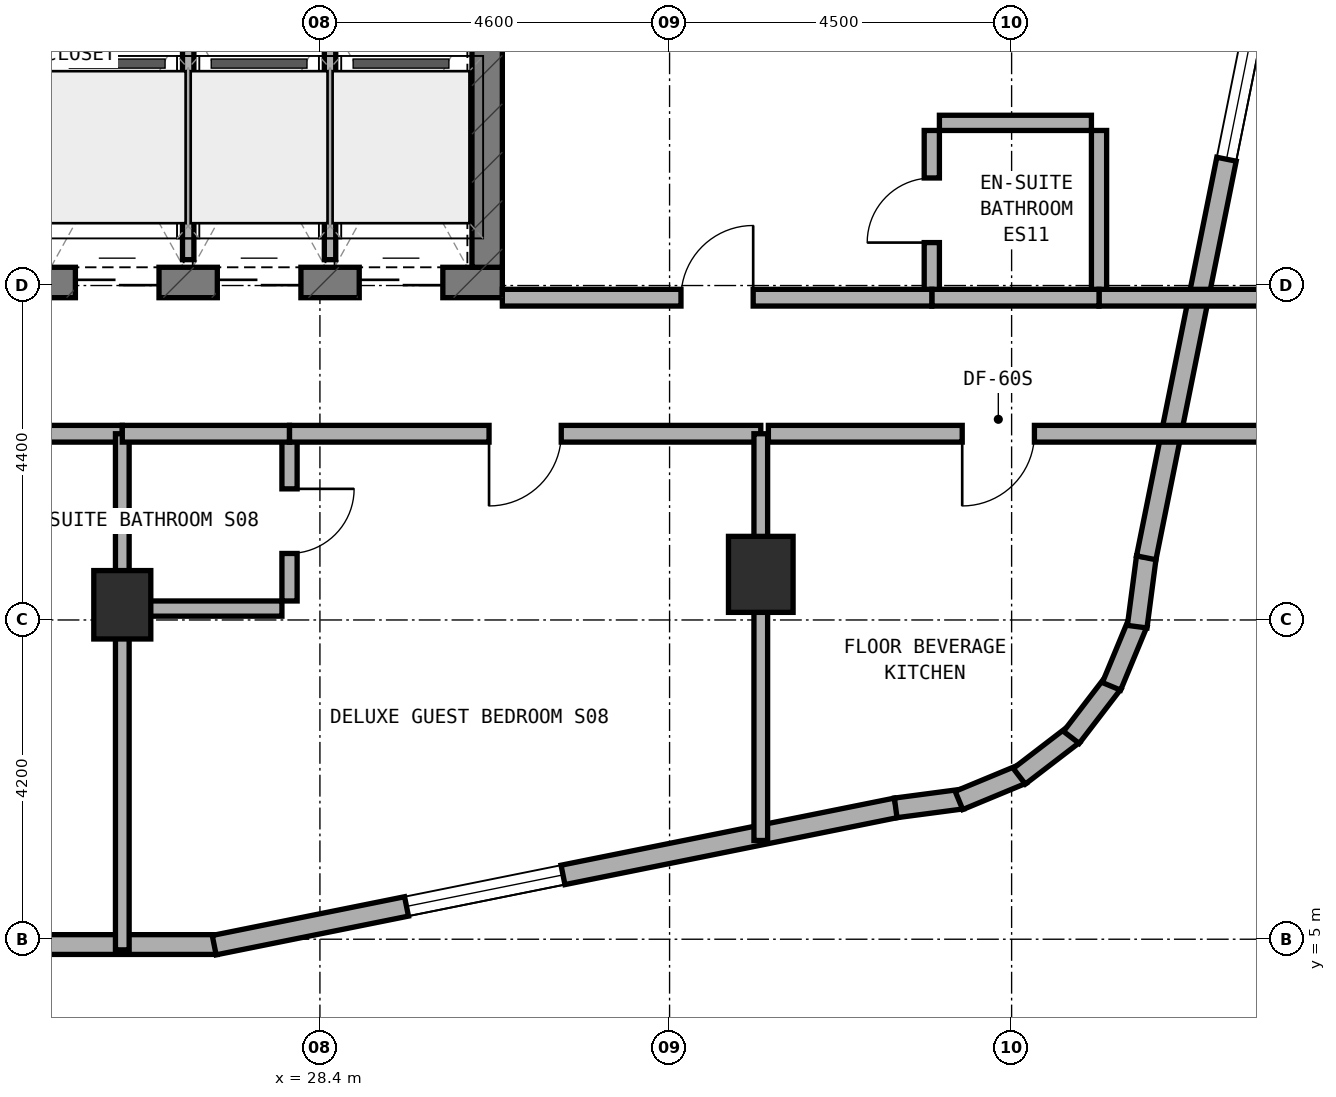
"""IFC4 building model, lengths in metres.
Left out: names, types, materials, properties, quantities, classifications, styles, units other than length and angle.
Written with IfcOpenShell. Run it as: python <this file> out.ifc"""

import sys

from ifc_helpers import new_model, si_unit, direction, frame, frame_2d, origin, origin_2d, place, context, subcontext, project, spatial, rectangle, extrude, element, fill, save


model = new_model("IFC4")
c1 = context("Model", 3, precision=1e-05, world=origin(), true_north=direction((0.0, 1.0)))
c2 = subcontext(c1, "Body", "Model", "MODEL_VIEW")
j1 = project(units=[si_unit("LENGTHUNIT", "METRE"), si_unit("PLANEANGLEUNIT", "RADIAN")], contexts=[c1])
p1 = place(None, origin())
s1 = spatial("IfcSite", under=j1, at=p1, CompositionType="ELEMENT")
p2 = place(p1, origin())
s2 = spatial("IfcBuilding", under=s1, at=p2, CompositionType="ELEMENT")
p3 = place(p2, frame((0.0, 0.0, 155.5)))
s3 = spatial("IfcBuildingStorey", under=s2, at=p3, CompositionType="ELEMENT", Elevation=155.5)
p4 = place(p3, frame((6.4, 13.64, 0.0), z_axis=(0.0, 0.0, 1.0), x_axis=(1.0, 0.0, 0.0)))
e1 = element("IfcWall", 1, at=p4, inside=s3, PredefinedType="SHEAR", context=c2, shape_type="SweptSolid", body=[
    extrude(rectangle(XDim=24.4, YDim=0.4, at=frame_2d((12.2, 0.0))), origin(), (0.0, 0.0, 1.0), 3.5),
])
p5 = place(p4, frame((9.15, 0.0, 0.0)))
e2 = element("IfcOpeningElement", 2, at=p5, cuts=e1, PredefinedType="OPENING", context=c2, shape_type="SweptSolid", body=[
    extrude(rectangle(XDim=1.2, YDim=2.15, at=frame_2d((0.6, 1.075))), frame((0.0, 0.21, 0.0), z_axis=(0.0, -1.0, 0.0), x_axis=(1.0, 0.0, 0.0)), (0.0, 0.0, 1.0), 0.42),
])
p6 = place(p4, frame((16.94, 0.0, 0.0)))
e3 = element("IfcOpeningElement", 3, at=p6, cuts=e1, PredefinedType="OPENING", context=c2, shape_type="SweptSolid", body=[
    extrude(rectangle(XDim=0.85, YDim=2.1, at=frame_2d((0.425, 1.05))), frame((0.0, 0.21, 0.0), z_axis=(0.0, -1.0, 0.0), x_axis=(1.0, 0.0, 0.0)), (0.0, 0.0, 1.0), 0.42),
])
p7 = place(p4, frame((18.783, 0.0, 0.0)))
e4 = element("IfcOpeningElement", 4, at=p7, cuts=e1, PredefinedType="OPENING", context=c2, shape_type="SweptSolid", body=[
    extrude(rectangle(XDim=1.1, YDim=2.15, at=frame_2d((0.55, 1.075))), frame((0.0, 0.21, 0.0), z_axis=(0.0, -1.0, 0.0), x_axis=(1.0, 0.0, 0.0)), (0.0, 0.0, 1.0), 0.42),
])
p8 = place(p4, frame((20.65, 0.0, 0.0)))
e5 = element("IfcOpeningElement", 5, at=p8, cuts=e1, PredefinedType="OPENING", context=c2, shape_type="SweptSolid", body=[
    extrude(rectangle(XDim=1.1, YDim=2.15, at=frame_2d((0.55, 1.075))), frame((0.0, 0.21, 0.0), z_axis=(0.0, -1.0, 0.0), x_axis=(1.0, 0.0, 0.0)), (0.0, 0.0, 1.0), 0.42),
])
p9 = place(p4, frame((22.517, 0.0, 0.0)))
e6 = element("IfcOpeningElement", 6, at=p9, cuts=e1, PredefinedType="OPENING", context=c2, shape_type="SweptSolid", body=[
    extrude(rectangle(XDim=1.1, YDim=2.15, at=frame_2d((0.55, 1.075))), frame((0.0, 0.21, 0.0), z_axis=(0.0, -1.0, 0.0), x_axis=(1.0, 0.0, 0.0)), (0.0, 0.0, 1.0), 0.42),
])
p10 = place(p3, frame((30.6, 13.84, 0.0), z_axis=(0.0, 0.0, 1.0), x_axis=(0.0, 1.0, 0.0)))
e7 = element("IfcWall", 7, at=p10, inside=s3, PredefinedType="SHEAR", context=c2, shape_type="SweptSolid", body=[
    extrude(rectangle(XDim=3.16, YDim=0.4, at=frame_2d((1.58, 0.0))), origin(), (0.0, 0.0, 1.0), 3.5),
])
p11 = place(p3, frame((25.8, 9.4, 0.0), z_axis=(0.0, 0.0, 1.0), x_axis=(1.0, 0.0, 0.0)))
e8 = element("IfcColumn", 8, at=p11, inside=s3, PredefinedType="COLUMN", context=c2, shape_type="SweptSolid", body=[
    extrude(rectangle(XDim=0.75, YDim=0.9, at=origin_2d()), origin(), (0.0, 0.0, 1.0), 3.5),
])
p12 = place(p3, frame((34.2, 9.8, 0.0), z_axis=(0.0, 0.0, 1.0), x_axis=(1.0, 0.0, 0.0)))
e9 = element("IfcColumn", 9, at=p12, inside=s3, PredefinedType="COLUMN", context=c2, shape_type="SweptSolid", body=[
    extrude(rectangle(XDim=0.85, YDim=1.0, at=origin_2d()), origin(), (0.0, 0.0, 1.0), 3.5),
])
p13 = place(p3, frame((14.915, 4.93, 0.0), z_axis=(0.0, 0.0, 1.0), x_axis=(1.0, 0.0, 0.0)))
e10 = element("IfcWall", 10, at=p13, inside=s3, PredefinedType="STANDARD", context=c2, shape_type="SweptSolid", body=[
    extrude(rectangle(XDim=12.135, YDim=0.26, at=frame_2d((6.067, 0.0))), origin(), (0.0, 0.0, 1.0), 3.22),
])
p14 = place(p13, frame((5.485, 0.0, 0.0)))
e11 = element("IfcOpeningElement", 11, at=p14, cuts=e10, PredefinedType="OPENING", context=c2, shape_type="SweptSolid", body=[
    extrude(rectangle(XDim=1.2, YDim=2.15, at=frame_2d((0.6, 1.075))), frame((0.0, 0.14, 0.0), z_axis=(0.0, -1.0, 0.0), x_axis=(1.0, 0.0, 0.0)), (0.0, 0.0, 1.0), 0.28),
])
p15 = place(p13, frame((2.26, 0.0, 0.85)))
e12 = element("IfcOpeningElement", 12, at=p15, cuts=e10, PredefinedType="OPENING", context=c2, shape_type="SweptSolid", body=[
    extrude(rectangle(XDim=2.1, YDim=1.5, at=frame_2d((1.05, 0.75))), frame((0.0, 0.14, 0.0), z_axis=(0.0, -1.0, 0.0), x_axis=(1.0, 0.0, 0.0)), (0.0, 0.0, 1.0), 0.28),
])
p16 = place(p13, frame((7.81, 0.0, 0.85)))
e13 = element("IfcOpeningElement", 13, at=p16, cuts=e10, PredefinedType="OPENING", context=c2, shape_type="SweptSolid", body=[
    extrude(rectangle(XDim=2.1, YDim=1.5, at=frame_2d((1.05, 0.75))), frame((0.0, 0.14, 0.0), z_axis=(0.0, -1.0, 0.0), x_axis=(1.0, 0.0, 0.0)), (0.0, 0.0, 1.0), 0.28),
])
p17 = place(p3, frame((27.009, 4.922, 0.0), z_axis=(0.0, 0.0, 1.0), x_axis=(0.980321298532, 0.197408590603, 0.0)))
e14 = element("IfcWall", 14, at=p17, inside=s3, PredefinedType="STANDARD", context=c2, shape_type="SweptSolid", body=[
    extrude(rectangle(XDim=9.153, YDim=0.26, at=frame_2d((4.577, 0.0))), origin(), (0.0, 0.0, 1.0), 3.22),
])
p18 = place(p17, frame((2.581, 0.0, 0.85)))
e15 = element("IfcOpeningElement", 15, at=p18, cuts=e14, PredefinedType="OPENING", context=c2, shape_type="SweptSolid", body=[
    extrude(rectangle(XDim=2.1, YDim=1.5, at=frame_2d((1.05, 0.75))), frame((0.0, 0.14, 0.0), z_axis=(0.0, -1.0, 0.0), x_axis=(1.0, 0.0, 0.0)), (0.0, 0.0, 1.0), 0.28),
])
p19 = place(p3, frame((35.975, 6.728, 0.0), z_axis=(0.0, 0.0, 1.0), x_axis=(0.991388484223, 0.130953706898, 0.0)))
e16 = element("IfcWall", 16, at=p19, inside=s3, PredefinedType="STANDARD", context=c2, shape_type="SweptSolid", body=[
    extrude(rectangle(XDim=0.885, YDim=0.26, at=frame_2d((0.443, 0.0))), origin(), (0.0, 0.0, 1.0), 3.22),
])
p20 = place(p3, frame((36.807, 6.826, 0.0), z_axis=(0.0, 0.0, 1.0), x_axis=(0.923627776508, 0.383290660547, 0.0)))
e17 = element("IfcWall", 17, at=p20, inside=s3, PredefinedType="STANDARD", context=c2, shape_type="SweptSolid", body=[
    extrude(rectangle(XDim=0.903, YDim=0.26, at=frame_2d((0.452, 0.0))), origin(), (0.0, 0.0, 1.0), 3.22),
])
p21 = place(p3, frame((37.601, 7.144, 0.0), z_axis=(0.0, 0.0, 1.0), x_axis=(0.793458244748, 0.608624690463, 0.0)))
e18 = element("IfcWall", 18, at=p21, inside=s3, PredefinedType="STANDARD", context=c2, shape_type="SweptSolid", body=[
    extrude(rectangle(XDim=0.902, YDim=0.26, at=frame_2d((0.451, 0.0))), origin(), (0.0, 0.0, 1.0), 3.22),
])
p22 = place(p3, frame((38.286, 7.655, 0.0), z_axis=(0.0, 0.0, 1.0), x_axis=(0.608494022858, 0.793558456666, 0.0)))
e19 = element("IfcWall", 19, at=p22, inside=s3, PredefinedType="STANDARD", context=c2, shape_type="SweptSolid", body=[
    extrude(rectangle(XDim=0.902, YDim=0.26, at=frame_2d((0.451, 0.0))), origin(), (0.0, 0.0, 1.0), 3.22),
])
p23 = place(p3, frame((38.814, 8.327, 0.0), z_axis=(0.0, 0.0, 1.0), x_axis=(0.383155708213, 0.923683767999, 0.0)))
e20 = element("IfcWall", 20, at=p23, inside=s3, PredefinedType="STANDARD", context=c2, shape_type="SweptSolid", body=[
    extrude(rectangle(XDim=0.903, YDim=0.26, at=frame_2d((0.451, 0.0))), origin(), (0.0, 0.0, 1.0), 3.22),
])
p24 = place(p3, frame((39.152, 9.112, 0.0), z_axis=(0.0, 0.0, 1.0), x_axis=(0.130200706103, 0.991487658083, 0.0)))
e21 = element("IfcWall", 21, at=p24, inside=s3, PredefinedType="STANDARD", context=c2, shape_type="SweptSolid", body=[
    extrude(rectangle(XDim=0.921, YDim=0.26, at=frame_2d((0.46, 0.0))), origin(), (0.0, 0.0, 1.0), 3.22),
])
p25 = place(p3, frame((39.271, 10.018, 0.0), z_axis=(0.0, 0.0, 1.0), x_axis=(0.197435082048, 0.980315963543, 0.0)))
e22 = element("IfcWall", 22, at=p25, inside=s3, PredefinedType="STANDARD", context=c2, shape_type="SweptSolid", body=[
    extrude(rectangle(XDim=9.183, YDim=0.26, at=frame_2d((4.591, 0.0))), origin(), (0.0, 0.0, 1.0), 3.22),
])
p26 = place(p25, frame((5.349, 0.0, 0.85)))
e23 = element("IfcOpeningElement", 23, at=p26, cuts=e22, PredefinedType="OPENING", context=c2, shape_type="SweptSolid", body=[
    extrude(rectangle(XDim=2.1, YDim=1.5, at=frame_2d((1.05, 0.75))), frame((0.0, 0.14, 0.0), z_axis=(0.0, -1.0, 0.0), x_axis=(1.0, 0.0, 0.0)), (0.0, 0.0, 1.0), 0.28),
])
p27 = place(p3, frame((26.667, 13.94, 0.0), z_axis=(0.0, 0.0, 1.0), x_axis=(0.0, 1.0, 0.0)))
e24 = element("IfcWall", 24, at=p27, inside=s3, PredefinedType="PARTITIONING", context=c2, shape_type="SweptSolid", body=[
    extrude(rectangle(XDim=2.96, YDim=0.15, at=frame_2d((1.48, 0.0))), origin(), (0.0, 0.0, 1.0), 3.22),
])
p28 = place(p3, frame((28.533, 13.94, 0.0), z_axis=(0.0, 0.0, 1.0), x_axis=(0.0, 1.0, 0.0)))
e25 = element("IfcWall", 25, at=p28, inside=s3, PredefinedType="PARTITIONING", context=c2, shape_type="SweptSolid", body=[
    extrude(rectangle(XDim=2.96, YDim=0.15, at=frame_2d((1.48, 0.0))), origin(), (0.0, 0.0, 1.0), 2.795),
])
p29 = place(p3, frame((18.4, 11.65, 0.0), z_axis=(0.0, 0.0, 1.0), x_axis=(1.0, 0.0, 0.0)))
e26 = element("IfcWall", 26, at=p29, inside=s3, PredefinedType="SOLIDWALL", context=c2, shape_type="SweptSolid", body=[
    extrude(rectangle(XDim=7.4, YDim=0.22, at=frame_2d((3.7, 0.0))), origin(), (0.0, 0.0, 1.0), 2.795),
])
p30 = place(p29, frame((3.225, 0.0, 0.0)))
e27 = element("IfcOpeningElement", 27, at=p30, cuts=e26, PredefinedType="OPENING", context=c2, shape_type="SweptSolid", body=[
    extrude(rectangle(XDim=0.95, YDim=2.1, at=frame_2d((0.475, 1.05))), frame((0.0, 0.12, 0.0), z_axis=(0.0, -1.0, 0.0), x_axis=(1.0, 0.0, 0.0)), (0.0, 0.0, 1.0), 0.24),
])
p31 = place(p3, frame((25.8, 4.86, 0.0), z_axis=(0.0, 0.0, 1.0), x_axis=(0.0, 1.0, 0.0)))
e28 = element("IfcWall", 28, at=p31, inside=s3, PredefinedType="SOLIDWALL", context=c2, shape_type="SweptSolid", body=[
    extrude(rectangle(XDim=6.79, YDim=0.18, at=frame_2d((3.395, 0.0))), origin(), (0.0, 0.0, 1.0), 2.795),
])
p32 = place(p3, frame((28.0, 9.45, 0.0), z_axis=(0.0, 0.0, 1.0), x_axis=(0.0, 1.0, 0.0)))
e29 = element("IfcWall", 29, at=p32, inside=s3, PredefinedType="PLUMBINGWALL", context=c2, shape_type="SweptSolid", body=[
    extrude(rectangle(XDim=2.1, YDim=0.2, at=frame_2d((1.05, 0.0))), origin(), (0.0, 0.0, 1.0), 2.795),
])
p33 = place(p32, frame((0.625, 0.0, 0.0)))
e30 = element("IfcOpeningElement", 30, at=p33, cuts=e29, PredefinedType="OPENING", context=c2, shape_type="SweptSolid", body=[
    extrude(rectangle(XDim=0.85, YDim=2.1, at=frame_2d((0.425, 1.05))), frame((0.0, 0.11, 0.0), z_axis=(0.0, -1.0, 0.0), x_axis=(1.0, 0.0, 0.0)), (0.0, 0.0, 1.0), 0.22),
])
p34 = place(p3, frame((25.9, 9.35, 0.0), z_axis=(0.0, 0.0, 1.0), x_axis=(1.0, 0.0, 0.0)))
e31 = element("IfcWall", 31, at=p34, inside=s3, PredefinedType="PLUMBINGWALL", context=c2, shape_type="SweptSolid", body=[
    extrude(rectangle(XDim=2.0, YDim=0.2, at=frame_2d((1.0, 0.0))), origin(), (0.0, 0.0, 1.0), 2.835),
])
p35 = place(p3, frame((25.8, 11.65, 0.0), z_axis=(0.0, 0.0, 1.0), x_axis=(1.0, 0.0, 0.0)))
e32 = element("IfcWall", 32, at=p35, inside=s3, PredefinedType="SOLIDWALL", context=c2, shape_type="SweptSolid", body=[
    extrude(rectangle(XDim=2.2, YDim=0.22, at=frame_2d((1.1, 0.0))), origin(), (0.0, 0.0, 1.0), 2.795),
])
p36 = place(p3, frame((28.0, 11.65, 0.0), z_axis=(0.0, 0.0, 1.0), x_axis=(1.0, 0.0, 0.0)))
e33 = element("IfcWall", 33, at=p36, inside=s3, PredefinedType="SOLIDWALL", context=c2, shape_type="SweptSolid", body=[
    extrude(rectangle(XDim=6.2, YDim=0.22, at=frame_2d((3.1, 0.0))), origin(), (0.0, 0.0, 1.0), 2.795),
])
p37 = place(p36, frame((2.625, 0.0, 0.0)))
e34 = element("IfcOpeningElement", 34, at=p37, cuts=e33, PredefinedType="OPENING", context=c2, shape_type="SweptSolid", body=[
    extrude(rectangle(XDim=0.95, YDim=2.1, at=frame_2d((0.475, 1.05))), frame((0.0, 0.12, 0.0), z_axis=(0.0, -1.0, 0.0), x_axis=(1.0, 0.0, 0.0)), (0.0, 0.0, 1.0), 0.24),
])
p38 = place(p3, frame((34.2, 6.299, 0.0), z_axis=(0.0, 0.0, 1.0), x_axis=(0.0, 1.0, 0.0)))
e35 = element("IfcWall", 35, at=p38, inside=s3, PredefinedType="SOLIDWALL", context=c2, shape_type="SweptSolid", body=[
    extrude(rectangle(XDim=5.351, YDim=0.18, at=frame_2d((2.675, 0.0))), origin(), (0.0, 0.0, 1.0), 2.795),
])
p39 = place(p3, frame((34.3, 11.65, 0.0), z_axis=(0.0, 0.0, 1.0), x_axis=(1.0, 0.0, 0.0)))
e36 = element("IfcWall", 36, at=p39, inside=s3, PredefinedType="SOLIDWALL", context=c2, shape_type="SweptSolid", body=[
    extrude(rectangle(XDim=6.64, YDim=0.22, at=frame_2d((3.32, 0.0))), origin(), (0.0, 0.0, 1.0), 2.835),
])
p40 = place(p39, frame((2.55, 0.0, 0.0)))
e37 = element("IfcOpeningElement", 37, at=p40, cuts=e36, PredefinedType="OPENING", context=c2, shape_type="SweptSolid", body=[
    extrude(rectangle(XDim=0.95, YDim=2.1, at=frame_2d((0.475, 1.05))), frame((0.0, 0.12, 0.0), z_axis=(0.0, -1.0, 0.0), x_axis=(1.0, 0.0, 0.0)), (0.0, 0.0, 1.0), 0.24),
])
p41 = place(p3, frame((36.45, 13.54, 0.0), z_axis=(0.0, 0.0, 1.0), x_axis=(0.0, 1.0, 0.0)))
e38 = element("IfcWall", 38, at=p41, inside=s3, PredefinedType="PLUMBINGWALL", context=c2, shape_type="SweptSolid", body=[
    extrude(rectangle(XDim=2.1, YDim=0.2, at=frame_2d((1.05, 0.0))), origin(), (0.0, 0.0, 1.0), 3.22),
])
p42 = place(p41, frame((0.625, 0.0, 0.0)))
e39 = element("IfcOpeningElement", 39, at=p42, cuts=e38, PredefinedType="OPENING", context=c2, shape_type="SweptSolid", body=[
    extrude(rectangle(XDim=0.85, YDim=2.1, at=frame_2d((0.425, 1.05))), frame((0.0, 0.11, 0.0), z_axis=(0.0, -1.0, 0.0), x_axis=(1.0, 0.0, 0.0)), (0.0, 0.0, 1.0), 0.22),
])
p43 = place(p3, frame((36.55, 15.74, 0.0), z_axis=(0.0, 0.0, 1.0), x_axis=(1.0, 0.0, 0.0)))
e40 = element("IfcWall", 40, at=p43, inside=s3, PredefinedType="PLUMBINGWALL", context=c2, shape_type="SweptSolid", body=[
    extrude(rectangle(XDim=2.0, YDim=0.2, at=frame_2d((1.0, 0.0))), origin(), (0.0, 0.0, 1.0), 3.22),
])
p44 = place(p3, frame((38.65, 13.54, 0.0), z_axis=(0.0, 0.0, 1.0), x_axis=(0.0, 1.0, 0.0)))
e41 = element("IfcWall", 41, at=p44, inside=s3, PredefinedType="PLUMBINGWALL", context=c2, shape_type="SweptSolid", body=[
    extrude(rectangle(XDim=2.1, YDim=0.2, at=frame_2d((1.05, 0.0))), origin(), (0.0, 0.0, 1.0), 3.22),
])
p45 = place(p3, frame((38.65, 13.44, 0.0), z_axis=(0.0, 0.0, 1.0), x_axis=(1.0, 0.0, 0.0)))
e42 = element("IfcWall", 42, at=p45, inside=s3, PredefinedType="SOLIDWALL", context=c2, shape_type="SweptSolid", body=[
    extrude(rectangle(XDim=2.55, YDim=0.22, at=frame_2d((1.275, 0.0))), origin(), (0.0, 0.0, 1.0), 3.22),
])
p46 = place(p3, frame((36.45, 13.44, 0.0), z_axis=(0.0, 0.0, 1.0), x_axis=(1.0, 0.0, 0.0)))
e43 = element("IfcWall", 43, at=p46, inside=s3, PredefinedType="SOLIDWALL", context=c2, shape_type="SweptSolid", body=[
    extrude(rectangle(XDim=2.2, YDim=0.22, at=frame_2d((1.1, 0.0))), origin(), (0.0, 0.0, 1.0), 3.22),
])
p47 = place(p3, frame((30.8, 13.44, 0.0), z_axis=(0.0, 0.0, 1.0), x_axis=(1.0, 0.0, 0.0)))
e44 = element("IfcWall", 44, at=p47, inside=s3, PredefinedType="SOLIDWALL", context=c2, shape_type="SweptSolid", body=[
    extrude(rectangle(XDim=5.65, YDim=0.22, at=frame_2d((2.825, 0.0))), origin(), (0.0, 0.0, 1.0), 2.795),
])
p48 = place(p47, frame((2.35, 0.0, 0.0)))
e45 = element("IfcOpeningElement", 45, at=p48, cuts=e44, PredefinedType="OPENING", context=c2, shape_type="SweptSolid", body=[
    extrude(rectangle(XDim=0.95, YDim=2.1, at=frame_2d((0.475, 1.05))), frame((0.0, 0.12, 0.0), z_axis=(0.0, -1.0, 0.0), x_axis=(1.0, 0.0, 0.0)), (0.0, 0.0, 1.0), 0.24),
])
p49 = place(p18, origin())
e46 = element("IfcWindow", 46, at=p49, inside=s3, PartitioningType="SINGLE_PANEL", PredefinedType="WINDOW", context=c2, shape_type="SweptSolid", body=[
    extrude(rectangle(XDim=2.1, YDim=1.5, at=frame_2d((1.05, 0.75))), frame((0.0, 0.03, 0.0), z_axis=(0.0, -1.0, 0.0), x_axis=(1.0, 0.0, 0.0)), (0.0, 0.0, 1.0), 0.06),
])
fill(e15, e46)
p50 = place(p26, origin())
e47 = element("IfcWindow", 47, at=p50, inside=s3, PartitioningType="SINGLE_PANEL", PredefinedType="WINDOW", context=c2, shape_type="SweptSolid", body=[
    extrude(rectangle(XDim=2.1, YDim=1.5, at=frame_2d((1.05, 0.75))), frame((0.0, 0.03, 0.0), z_axis=(0.0, -1.0, 0.0), x_axis=(1.0, 0.0, 0.0)), (0.0, 0.0, 1.0), 0.06),
])
fill(e23, e47)
p51 = place(p7, frame((1.1, 0.0, 0.0), z_axis=(0.0, 0.0, 1.0), x_axis=(-1.0, 0.0, 0.0)))
e48 = element("IfcDoor", 48, at=p51, inside=s3, OperationType="DOUBLE_DOOR_SLIDING", PredefinedType="DOOR", context=c2, shape_type="SweptSolid", body=[
    extrude(rectangle(XDim=1.1, YDim=2.15, at=frame_2d((0.55, 1.075))), frame((0.0, 0.025, 0.0), z_axis=(0.0, -1.0, 0.0), x_axis=(1.0, 0.0, 0.0)), (0.0, 0.0, 1.0), 0.05),
])
fill(e4, e48)
p52 = place(p8, frame((1.1, 0.0, 0.0), z_axis=(0.0, 0.0, 1.0), x_axis=(-1.0, 0.0, 0.0)))
e49 = element("IfcDoor", 49, at=p52, inside=s3, OperationType="DOUBLE_DOOR_SLIDING", PredefinedType="DOOR", context=c2, shape_type="SweptSolid", body=[
    extrude(rectangle(XDim=1.1, YDim=2.15, at=frame_2d((0.55, 1.075))), frame((0.0, 0.025, 0.0), z_axis=(0.0, -1.0, 0.0), x_axis=(1.0, 0.0, 0.0)), (0.0, 0.0, 1.0), 0.05),
])
fill(e5, e49)
p53 = place(p9, frame((1.1, 0.0, 0.0), z_axis=(0.0, 0.0, 1.0), x_axis=(-1.0, 0.0, 0.0)))
e50 = element("IfcDoor", 50, at=p53, inside=s3, OperationType="DOUBLE_DOOR_SLIDING", PredefinedType="DOOR", context=c2, shape_type="SweptSolid", body=[
    extrude(rectangle(XDim=1.1, YDim=2.15, at=frame_2d((0.55, 1.075))), frame((0.0, 0.025, 0.0), z_axis=(0.0, -1.0, 0.0), x_axis=(1.0, 0.0, 0.0)), (0.0, 0.0, 1.0), 0.05),
])
fill(e6, e50)
p54 = place(p33, frame((0.85, 0.0, 0.0), z_axis=(0.0, 0.0, 1.0), x_axis=(-1.0, 0.0, 0.0)))
e51 = element("IfcDoor", 51, at=p54, inside=s3, OperationType="SINGLE_SWING_LEFT", PredefinedType="DOOR", context=c2, shape_type="SweptSolid", body=[
    extrude(rectangle(XDim=0.85, YDim=2.1, at=frame_2d((0.425, 1.05))), frame((0.0, 0.025, 0.0), z_axis=(0.0, -1.0, 0.0), x_axis=(1.0, 0.0, 0.0)), (0.0, 0.0, 1.0), 0.05),
])
fill(e30, e51)
p55 = place(p37, frame((0.95, 0.0, 0.0), z_axis=(0.0, 0.0, 1.0), x_axis=(-1.0, 0.0, 0.0)))
e52 = element("IfcDoor", 52, at=p55, inside=s3, OperationType="SINGLE_SWING_RIGHT", PredefinedType="DOOR", context=c2, shape_type="SweptSolid", body=[
    extrude(rectangle(XDim=0.95, YDim=2.1, at=frame_2d((0.475, 1.05))), frame((0.0, 0.025, 0.0), z_axis=(0.0, -1.0, 0.0), x_axis=(1.0, 0.0, 0.0)), (0.0, 0.0, 1.0), 0.05),
])
fill(e34, e52)
p56 = place(p40, frame((0.95, 0.0, 0.0), z_axis=(0.0, 0.0, 1.0), x_axis=(-1.0, 0.0, 0.0)))
e53 = element("IfcDoor", 53, at=p56, inside=s3, OperationType="SINGLE_SWING_RIGHT", PredefinedType="DOOR", context=c2, shape_type="SweptSolid", body=[
    extrude(rectangle(XDim=0.95, YDim=2.1, at=frame_2d((0.475, 1.05))), frame((0.0, 0.025, 0.0), z_axis=(0.0, -1.0, 0.0), x_axis=(1.0, 0.0, 0.0)), (0.0, 0.0, 1.0), 0.05),
])
fill(e37, e53)
p57 = place(p42, origin())
e54 = element("IfcDoor", 54, at=p57, inside=s3, OperationType="SINGLE_SWING_LEFT", PredefinedType="DOOR", context=c2, shape_type="SweptSolid", body=[
    extrude(rectangle(XDim=0.85, YDim=2.1, at=frame_2d((0.425, 1.05))), frame((0.0, 0.025, 0.0), z_axis=(0.0, -1.0, 0.0), x_axis=(1.0, 0.0, 0.0)), (0.0, 0.0, 1.0), 0.05),
])
fill(e39, e54)
p58 = place(p48, origin())
e55 = element("IfcDoor", 55, at=p58, inside=s3, OperationType="SINGLE_SWING_RIGHT", PredefinedType="DOOR", context=c2, shape_type="SweptSolid", body=[
    extrude(rectangle(XDim=0.95, YDim=2.1, at=frame_2d((0.475, 1.05))), frame((0.0, 0.025, 0.0), z_axis=(0.0, -1.0, 0.0), x_axis=(1.0, 0.0, 0.0)), (0.0, 0.0, 1.0), 0.05),
])
fill(e45, e55)
save(model, sys.argv[1])
